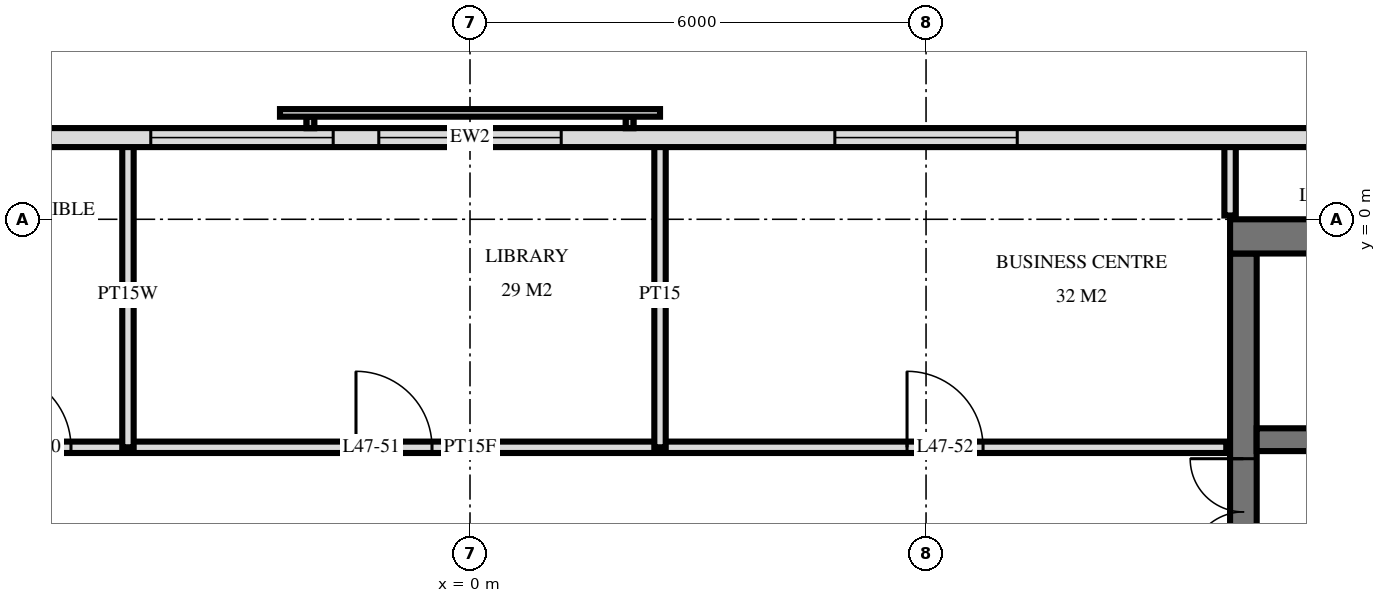
"""IFC4 building model, lengths in metres.
Left out: names, types, materials, properties, quantities, classifications, styles, units other than length and angle.
Written with IfcOpenShell. Run it as: python <this file> out.ifc"""

import sys

from ifc_helpers import new_model, si_unit, direction, frame, frame_2d, origin, place, context, subcontext, project, spatial, rectangle, extrude, element, fill, save


model = new_model("IFC4")
c1 = context("Model", 3, precision=1e-05, world=origin(), true_north=direction((0.0, 1.0)))
c2 = subcontext(c1, "Body", "Model", "MODEL_VIEW")
j1 = project(units=[si_unit("LENGTHUNIT", "METRE"), si_unit("PLANEANGLEUNIT", "RADIAN")], contexts=[c1])
p1 = place(None, origin())
s1 = spatial("IfcSite", under=j1, at=p1, CompositionType="ELEMENT")
p2 = place(p1, origin())
s2 = spatial("IfcBuilding", under=s1, at=p2, CompositionType="ELEMENT")
p3 = place(p2, frame((0.0, 0.0, 183.6)))
s3 = spatial("IfcBuildingStorey", under=s2, at=p3, CompositionType="ELEMENT", Elevation=183.6)
p4 = place(p3, frame((10.0, -0.225, 0.0), z_axis=(0.0, 0.0, 1.0), x_axis=(1.0, 0.0, 0.0)))
e1 = element("IfcWall", 1, at=p4, inside=s3, PredefinedType="SHEAR", context=c2, shape_type="SweptSolid", body=[
    extrude(rectangle(XDim=14.5, YDim=0.45, at=frame_2d((7.25, 0.0))), origin(), (0.0, 0.0, 1.0), 3.5),
])
p5 = place(p3, frame((10.175, -14.55, 0.0), z_axis=(0.0, 0.0, 1.0), x_axis=(0.0, 1.0, 0.0)))
e2 = element("IfcWall", 2, at=p5, inside=s3, PredefinedType="SHEAR", context=c2, shape_type="SweptSolid", body=[
    extrude(rectangle(XDim=14.1, YDim=0.35, at=frame_2d((7.05, 0.0))), origin(), (0.0, 0.0, 1.0), 3.5),
])
p6 = place(p5, frame((8.4, 0.0, 0.0)))
e3 = element("IfcOpeningElement", 3, at=p6, cuts=e2, PredefinedType="OPENING", context=c2, shape_type="SweptSolid", body=[
    extrude(rectangle(XDim=1.4, YDim=2.4, at=frame_2d((0.7, 1.2))), frame((0.0, 0.185, 0.0), z_axis=(0.0, -1.0, 0.0), x_axis=(1.0, 0.0, 0.0)), (0.0, 0.0, 1.0), 0.37),
])
p7 = place(p5, frame((10.0, 0.0, 0.0)))
e4 = element("IfcOpeningElement", 4, at=p7, cuts=e2, PredefinedType="OPENING", context=c2, shape_type="SweptSolid", body=[
    extrude(rectangle(XDim=1.4, YDim=2.4, at=frame_2d((0.7, 1.2))), frame((0.0, 0.185, 0.0), z_axis=(0.0, -1.0, 0.0), x_axis=(1.0, 0.0, 0.0)), (0.0, 0.0, 1.0), 0.37),
])
p8 = place(p5, frame((4.0, 0.0, 0.0)))
e5 = element("IfcOpeningElement", 5, at=p8, cuts=e2, PredefinedType="OPENING", context=c2, shape_type="SweptSolid", body=[
    extrude(rectangle(XDim=1.2, YDim=2.1, at=frame_2d((0.6, 1.05))), frame((0.0, 0.185, 0.0), z_axis=(0.0, -1.0, 0.0), x_axis=(1.0, 0.0, 0.0)), (0.0, 0.0, 1.0), 0.37),
])
p9 = place(p3, frame((10.35, -2.9, 0.0), z_axis=(0.0, 0.0, 1.0), x_axis=(1.0, 0.0, 0.0)))
e6 = element("IfcWall", 6, at=p9, inside=s3, PredefinedType="SHEAR", context=c2, shape_type="SweptSolid", body=[
    extrude(rectangle(XDim=13.7, YDim=0.3, at=frame_2d((6.85, 0.0))), origin(), (0.0, 0.0, 1.0), 3.5),
])
p10 = place(p9, frame((12.05, 0.0, 0.0)))
e7 = element("IfcOpeningElement", 7, at=p10, cuts=e6, PredefinedType="OPENING", context=c2, shape_type="SweptSolid", body=[
    extrude(rectangle(XDim=1.1, YDim=2.1, at=frame_2d((0.55, 1.05))), frame((0.0, 0.16, 0.0), z_axis=(0.0, -1.0, 0.0), x_axis=(1.0, 0.0, 0.0)), (0.0, 0.0, 1.0), 0.32),
])
p11 = place(p9, frame((6.9, 0.0, 0.0)))
e8 = element("IfcOpeningElement", 8, at=p11, cuts=e6, PredefinedType="OPENING", context=c2, shape_type="SweptSolid", body=[
    extrude(rectangle(XDim=0.9, YDim=2.1, at=frame_2d((0.45, 1.05))), frame((0.0, 0.16, 0.0), z_axis=(0.0, -1.0, 0.0), x_axis=(1.0, 0.0, 0.0)), (0.0, 0.0, 1.0), 0.32),
])
p12 = place(p9, frame((0.85, 0.0, 0.0)))
e9 = element("IfcOpeningElement", 9, at=p12, cuts=e6, PredefinedType="OPENING", context=c2, shape_type="SweptSolid", body=[
    extrude(rectangle(XDim=1.0, YDim=2.1, at=frame_2d((0.5, 1.05))), frame((0.0, 0.16, 0.0), z_axis=(0.0, -1.0, 0.0), x_axis=(1.0, 0.0, 0.0)), (0.0, 0.0, 1.0), 0.32),
])
p13 = place(p9, frame((3.387, 0.0, 0.0)))
e10 = element("IfcOpeningElement", 10, at=p13, cuts=e6, PredefinedType="OPENING", context=c2, shape_type="SweptSolid", body=[
    extrude(rectangle(XDim=1.0, YDim=2.1, at=frame_2d((0.5, 1.05))), frame((0.0, 0.16, 0.0), z_axis=(0.0, -1.0, 0.0), x_axis=(1.0, 0.0, 0.0)), (0.0, 0.0, 1.0), 0.32),
])
p14 = place(p9, frame((4.812, 0.0, 0.0)))
e11 = element("IfcOpeningElement", 11, at=p14, cuts=e6, PredefinedType="OPENING", context=c2, shape_type="SweptSolid", body=[
    extrude(rectangle(XDim=1.0, YDim=2.1, at=frame_2d((0.5, 1.05))), frame((0.0, 0.16, 0.0), z_axis=(0.0, -1.0, 0.0), x_axis=(1.0, 0.0, 0.0)), (0.0, 0.0, 1.0), 0.32),
])
p15 = place(p9, frame((9.7, 0.0, 0.0)))
e12 = element("IfcOpeningElement", 12, at=p15, cuts=e6, PredefinedType="OPENING", context=c2, shape_type="SweptSolid", body=[
    extrude(rectangle(XDim=1.0, YDim=2.1, at=frame_2d((0.5, 1.05))), frame((0.0, 0.16, 0.0), z_axis=(0.0, -1.0, 0.0), x_axis=(1.0, 0.0, 0.0)), (0.0, 0.0, 1.0), 0.32),
])
p16 = place(p3, frame((22.475, 1.075, 0.0), z_axis=(0.0, 0.0, 1.0), x_axis=(-1.0, 0.0, 0.0)))
e13 = element("IfcWall", 13, at=p16, inside=s3, PredefinedType="SOLIDWALL", context=c2, shape_type="SweptSolid", body=[
    extrude(rectangle(XDim=44.951, YDim=0.25, at=frame_2d((22.475, 0.0))), origin(), (0.0, 0.0, 1.0), 3.22),
])
p17 = place(p16, frame((15.275, 0.0, 0.9)))
e14 = element("IfcOpeningElement", 14, at=p17, cuts=e13, PredefinedType="OPENING", context=c2, shape_type="SweptSolid", body=[
    extrude(rectangle(XDim=2.4, YDim=1.5, at=frame_2d((1.2, 0.75))), frame((0.0, 0.135, 0.0), z_axis=(0.0, -1.0, 0.0), x_axis=(1.0, 0.0, 0.0)), (0.0, 0.0, 1.0), 0.27),
])
p18 = place(p16, frame((21.275, 0.0, 0.9)))
e15 = element("IfcOpeningElement", 15, at=p18, cuts=e13, PredefinedType="OPENING", context=c2, shape_type="SweptSolid", body=[
    extrude(rectangle(XDim=2.4, YDim=1.5, at=frame_2d((1.2, 0.75))), frame((0.0, 0.135, 0.0), z_axis=(0.0, -1.0, 0.0), x_axis=(1.0, 0.0, 0.0)), (0.0, 0.0, 1.0), 0.27),
])
p19 = place(p16, frame((24.275, 0.0, 0.9)))
e16 = element("IfcOpeningElement", 16, at=p19, cuts=e13, PredefinedType="OPENING", context=c2, shape_type="SweptSolid", body=[
    extrude(rectangle(XDim=2.4, YDim=1.5, at=frame_2d((1.2, 0.75))), frame((0.0, 0.135, 0.0), z_axis=(0.0, -1.0, 0.0), x_axis=(1.0, 0.0, 0.0)), (0.0, 0.0, 1.0), 0.27),
])
p20 = place(p3, frame((10.0, 0.05, 0.0), z_axis=(0.0, 0.0, 1.0), x_axis=(0.0, 1.0, 0.0)))
e17 = element("IfcWall", 17, at=p20, inside=s3, PredefinedType="PARTITIONING", context=c2, shape_type="SweptSolid", body=[
    extrude(rectangle(XDim=0.97, YDim=0.15, at=frame_2d((0.485, 0.0))), origin(), (0.0, 0.0, 1.0), 3.22),
])
p21 = place(p3, frame((2.5, -3.0, 0.0), z_axis=(0.0, 0.0, 1.0), x_axis=(0.0, 1.0, 0.0)))
e18 = element("IfcWall", 18, at=p21, inside=s3, PredefinedType="PARTITIONING", context=c2, shape_type="SweptSolid", body=[
    extrude(rectangle(XDim=4.02, YDim=0.15, at=frame_2d((2.01, 0.0))), origin(), (0.0, 0.0, 1.0), 3.22),
])
p22 = place(p3, frame((-4.5, -3.0, 0.0), z_axis=(0.0, 0.0, 1.0), x_axis=(0.0, 1.0, 0.0)))
e19 = element("IfcWall", 19, at=p22, inside=s3, PredefinedType="PLUMBINGWALL", context=c2, shape_type="SweptSolid", body=[
    extrude(rectangle(XDim=4.02, YDim=0.15, at=frame_2d((2.01, 0.0))), origin(), (0.0, 0.0, 1.0), 3.22),
])
p23 = place(p3, frame((-9.95, -3.0, 0.0), z_axis=(0.0, 0.0, 1.0), x_axis=(1.0, 0.0, 0.0)))
e20 = element("IfcWall", 20, at=p23, inside=s3, PredefinedType="PARTITIONING", context=c2, shape_type="SweptSolid", body=[
    extrude(rectangle(XDim=19.9, YDim=0.15, at=frame_2d((9.95, 0.0))), origin(), (0.0, 0.0, 1.0), 3.22),
])
p24 = place(p23, frame((0.95, 0.0, 0.0)))
e21 = element("IfcOpeningElement", 21, at=p24, cuts=e20, PredefinedType="OPENING", context=c2, shape_type="SweptSolid", body=[
    extrude(rectangle(XDim=1.0, YDim=2.1, at=frame_2d((0.5, 1.05))), frame((0.0, 0.085, 0.0), z_axis=(0.0, -1.0, 0.0), x_axis=(1.0, 0.0, 0.0)), (0.0, 0.0, 1.0), 0.17),
])
p25 = place(p23, frame((3.7, 0.0, 0.0)))
e22 = element("IfcOpeningElement", 22, at=p25, cuts=e20, PredefinedType="OPENING", context=c2, shape_type="SweptSolid", body=[
    extrude(rectangle(XDim=1.0, YDim=2.1, at=frame_2d((0.5, 1.05))), frame((0.0, 0.085, 0.0), z_axis=(0.0, -1.0, 0.0), x_axis=(1.0, 0.0, 0.0)), (0.0, 0.0, 1.0), 0.17),
])
p26 = place(p23, frame((8.45, 0.0, 0.0)))
e23 = element("IfcOpeningElement", 23, at=p26, cuts=e20, PredefinedType="OPENING", context=c2, shape_type="SweptSolid", body=[
    extrude(rectangle(XDim=1.0, YDim=2.1, at=frame_2d((0.5, 1.05))), frame((0.0, 0.085, 0.0), z_axis=(0.0, -1.0, 0.0), x_axis=(1.0, 0.0, 0.0)), (0.0, 0.0, 1.0), 0.17),
])
p27 = place(p23, frame((15.7, 0.0, 0.0)))
e24 = element("IfcOpeningElement", 24, at=p27, cuts=e20, PredefinedType="OPENING", context=c2, shape_type="SweptSolid", body=[
    extrude(rectangle(XDim=1.0, YDim=2.1, at=frame_2d((0.5, 1.05))), frame((0.0, 0.085, 0.0), z_axis=(0.0, -1.0, 0.0), x_axis=(1.0, 0.0, 0.0)), (0.0, 0.0, 1.0), 0.17),
])
p28 = place(p17, origin())
e25 = element("IfcWindow", 25, at=p28, inside=s3, PartitioningType="SINGLE_PANEL", PredefinedType="WINDOW", context=c2, shape_type="SweptSolid", body=[
    extrude(rectangle(XDim=2.4, YDim=1.5, at=frame_2d((1.2, 0.75))), frame((0.0, 0.03, 0.0), z_axis=(0.0, -1.0, 0.0), x_axis=(1.0, 0.0, 0.0)), (0.0, 0.0, 1.0), 0.06),
])
fill(e14, e25)
p29 = place(p18, origin())
e26 = element("IfcWindow", 26, at=p29, inside=s3, PartitioningType="SINGLE_PANEL", PredefinedType="WINDOW", context=c2, shape_type="SweptSolid", body=[
    extrude(rectangle(XDim=2.4, YDim=1.5, at=frame_2d((1.2, 0.75))), frame((0.0, 0.03, 0.0), z_axis=(0.0, -1.0, 0.0), x_axis=(1.0, 0.0, 0.0)), (0.0, 0.0, 1.0), 0.06),
])
fill(e15, e26)
p30 = place(p19, origin())
e27 = element("IfcWindow", 27, at=p30, inside=s3, PartitioningType="SINGLE_PANEL", PredefinedType="WINDOW", context=c2, shape_type="SweptSolid", body=[
    extrude(rectangle(XDim=2.4, YDim=1.5, at=frame_2d((1.2, 0.75))), frame((0.0, 0.03, 0.0), z_axis=(0.0, -1.0, 0.0), x_axis=(1.0, 0.0, 0.0)), (0.0, 0.0, 1.0), 0.06),
])
fill(e16, e27)
p31 = place(p7, origin())
e28 = element("IfcDoor", 28, at=p31, inside=s3, OperationType="DOUBLE_DOOR_SINGLE_SWING", PredefinedType="DOOR", context=c2, shape_type="SweptSolid", body=[
    extrude(rectangle(XDim=1.4, YDim=2.4, at=frame_2d((0.7, 1.2))), frame((0.0, 0.025, 0.0), z_axis=(0.0, -1.0, 0.0), x_axis=(1.0, 0.0, 0.0)), (0.0, 0.0, 1.0), 0.05),
])
fill(e4, e28)
p32 = place(p25, origin())
e29 = element("IfcDoor", 29, at=p32, inside=s3, OperationType="SINGLE_SWING_RIGHT", PredefinedType="DOOR", context=c2, shape_type="SweptSolid", body=[
    extrude(rectangle(XDim=1.0, YDim=2.1, at=frame_2d((0.5, 1.05))), frame((0.0, 0.025, 0.0), z_axis=(0.0, -1.0, 0.0), x_axis=(1.0, 0.0, 0.0)), (0.0, 0.0, 1.0), 0.05),
])
fill(e22, e29)
p33 = place(p26, origin())
e30 = element("IfcDoor", 30, at=p33, inside=s3, OperationType="SINGLE_SWING_RIGHT", PredefinedType="DOOR", context=c2, shape_type="SweptSolid", body=[
    extrude(rectangle(XDim=1.0, YDim=2.1, at=frame_2d((0.5, 1.05))), frame((0.0, 0.025, 0.0), z_axis=(0.0, -1.0, 0.0), x_axis=(1.0, 0.0, 0.0)), (0.0, 0.0, 1.0), 0.05),
])
fill(e23, e30)
p34 = place(p27, origin())
e31 = element("IfcDoor", 31, at=p34, inside=s3, OperationType="SINGLE_SWING_RIGHT", PredefinedType="DOOR", context=c2, shape_type="SweptSolid", body=[
    extrude(rectangle(XDim=1.0, YDim=2.1, at=frame_2d((0.5, 1.05))), frame((0.0, 0.025, 0.0), z_axis=(0.0, -1.0, 0.0), x_axis=(1.0, 0.0, 0.0)), (0.0, 0.0, 1.0), 0.05),
])
fill(e24, e31)
save(model, sys.argv[1])
